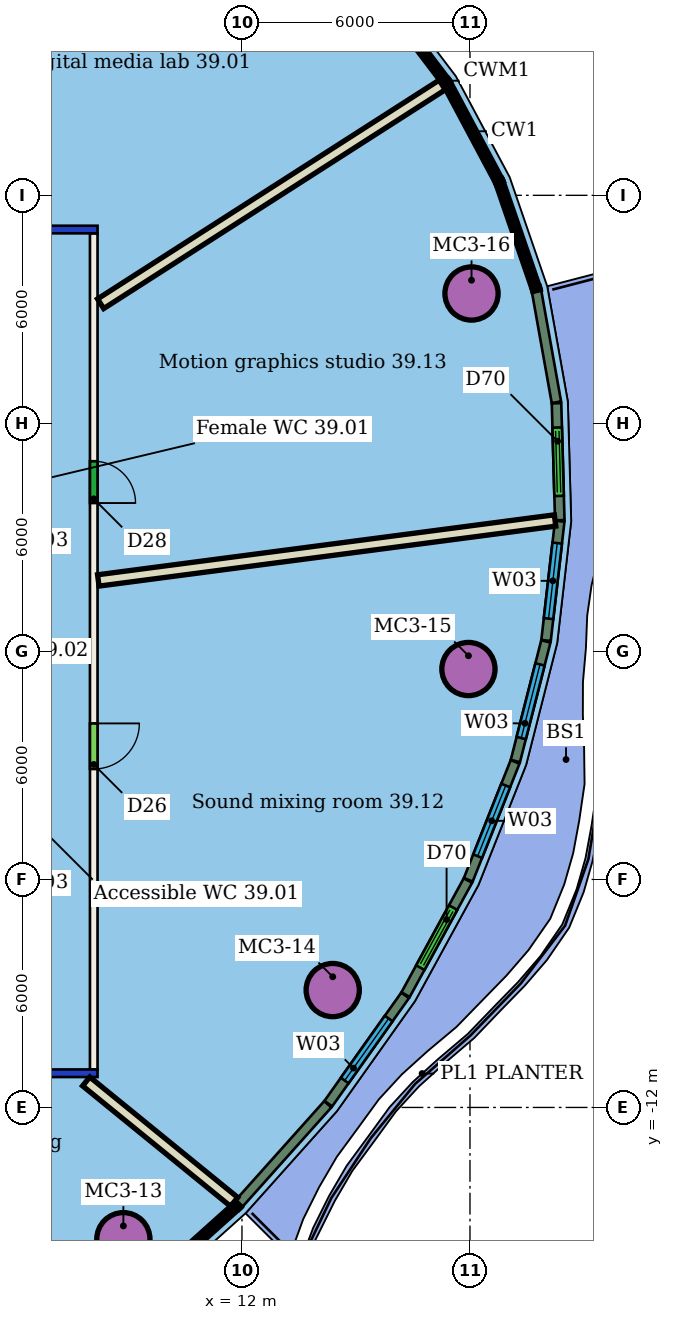
"""IFC4 building model, lengths in metres.
Left out: names, types, materials, properties, quantities, classifications, styles, units other than length and angle.
Written with IfcOpenShell. Run it as: python <this file> out.ifc"""

import sys

from ifc_helpers import new_model, si_unit, direction, frame, frame_2d, origin, origin_2d, place, context, subcontext, project, spatial, rectangle, hollow_circle, extrude, element, fill, save


model = new_model("IFC4")
c1 = context("Model", 3, precision=1e-05, world=origin(), true_north=direction((0.0, 1.0)))
c2 = subcontext(c1, "Body", "Model", "MODEL_VIEW")
j1 = project(units=[si_unit("LENGTHUNIT", "METRE"), si_unit("PLANEANGLEUNIT", "RADIAN")], contexts=[c1])
p1 = place(None, origin())
s1 = spatial("IfcSite", under=j1, at=p1, CompositionType="ELEMENT")
p2 = place(p1, origin())
s2 = spatial("IfcBuilding", under=s1, at=p2, CompositionType="ELEMENT")
p3 = place(p2, frame((0.0, 0.0, 165.0)))
s3 = spatial("IfcBuildingStorey", under=s2, at=p3, CompositionType="ELEMENT", Elevation=165.0)
for number, where, z_axis, x_axis in (
    (1, (8.879, -15.467, 0.0), (0.0, 0.0, 1.0), (1.0, 0.0, 0.0)),
    (2, (14.388, -8.912, 0.0), (0.0, 0.0, 1.0), (1.0, 0.0, 0.0)),
    (3, (17.959, -0.464, 0.0), (0.0, 0.0, 1.0), (1.0, 0.0, 0.0)),
    (4, (18.041, 9.417, 0.0), (0.0, 0.0, 1.0), (1.0, 0.0, 0.0)),
):
    element("IfcColumn", number, at=place(p3, frame(where, z_axis=z_axis, x_axis=x_axis)), inside=s3, PredefinedType="COLUMN", context=c2, shape_type="SweptSolid", body=[
        extrude(hollow_circle(Radius=0.7, WallThickness=0.05, at=origin_2d()), origin(), (0.0, 0.0, 1.0), 3.45),
    ])
p4 = place(p3, frame((8.2, -11.1, 0.0), z_axis=(0.0, 0.0, 1.0), x_axis=(-1.0, 0.0, 0.0)))
e5 = element("IfcWall", 5, at=p4, inside=s3, PredefinedType="PARTITIONING", context=c2, shape_type="SweptSolid", body=[
    extrude(rectangle(XDim=28.4, YDim=0.2, at=frame_2d((14.2, 0.0))), origin(), (0.0, 0.0, 1.0), 3.05),
])
p5 = place(p4, frame((24.59, 0.0, 0.0)))
e6 = element("IfcOpeningElement", 6, at=p5, cuts=e5, PredefinedType="OPENING", context=c2, shape_type="SweptSolid", body=[
    extrude(rectangle(XDim=1.2, YDim=2.1, at=frame_2d((0.6, 1.05))), frame((0.0, 0.11, 0.0), z_axis=(0.0, -1.0, 0.0), x_axis=(1.0, 0.0, 0.0)), (0.0, 0.0, 1.0), 0.22),
])
p6 = place(p4, frame((19.316, 0.0, 0.0)))
e7 = element("IfcOpeningElement", 7, at=p6, cuts=e5, PredefinedType="OPENING", context=c2, shape_type="SweptSolid", body=[
    extrude(rectangle(XDim=1.2, YDim=2.1, at=frame_2d((0.6, 1.05))), frame((0.0, 0.11, 0.0), z_axis=(0.0, -1.0, 0.0), x_axis=(1.0, 0.0, 0.0)), (0.0, 0.0, 1.0), 0.22),
])
p7 = place(p4, frame((14.986, 0.0, 0.0)))
e8 = element("IfcOpeningElement", 8, at=p7, cuts=e5, PredefinedType="OPENING", context=c2, shape_type="SweptSolid", body=[
    extrude(rectangle(XDim=1.8, YDim=2.4, at=frame_2d((0.9, 1.2))), frame((0.0, 0.11, 0.0), z_axis=(0.0, -1.0, 0.0), x_axis=(1.0, 0.0, 0.0)), (0.0, 0.0, 1.0), 0.22),
])
p8 = place(p4, frame((8.594, 0.0, 0.0)))
e9 = element("IfcOpeningElement", 9, at=p8, cuts=e5, PredefinedType="OPENING", context=c2, shape_type="SweptSolid", body=[
    extrude(rectangle(XDim=1.5, YDim=2.1, at=frame_2d((0.75, 1.05))), frame((0.0, 0.11, 0.0), z_axis=(0.0, -1.0, 0.0), x_axis=(1.0, 0.0, 0.0)), (0.0, 0.0, 1.0), 0.22),
])
p9 = place(p4, frame((4.011, 0.0, 0.0)))
e10 = element("IfcOpeningElement", 10, at=p9, cuts=e5, PredefinedType="OPENING", context=c2, shape_type="SweptSolid", body=[
    extrude(rectangle(XDim=1.2, YDim=2.1, at=frame_2d((0.6, 1.05))), frame((0.0, 0.11, 0.0), z_axis=(0.0, -1.0, 0.0), x_axis=(1.0, 0.0, 0.0)), (0.0, 0.0, 1.0), 0.22),
])
p10 = place(p3, frame((-20.2, 11.1, 0.0), z_axis=(0.0, 0.0, 1.0), x_axis=(1.0, 0.0, 0.0)))
e11 = element("IfcWall", 11, at=p10, inside=s3, PredefinedType="PARTITIONING", context=c2, shape_type="SweptSolid", body=[
    extrude(rectangle(XDim=28.4, YDim=0.2, at=frame_2d((14.2, 0.0))), origin(), (0.0, 0.0, 1.0), 3.05),
])
p11 = place(p10, frame((23.297, 0.0, 0.0)))
e12 = element("IfcOpeningElement", 12, at=p11, cuts=e11, PredefinedType="OPENING", context=c2, shape_type="SweptSolid", body=[
    extrude(rectangle(XDim=1.0, YDim=2.1, at=frame_2d((0.5, 1.05))), frame((0.0, 0.11, 0.0), z_axis=(0.0, -1.0, 0.0), x_axis=(1.0, 0.0, 0.0)), (0.0, 0.0, 1.0), 0.22),
])
p12 = place(p10, frame((15.555, 0.0, 0.0)))
e13 = element("IfcOpeningElement", 13, at=p12, cuts=e11, PredefinedType="OPENING", context=c2, shape_type="SweptSolid", body=[
    extrude(rectangle(XDim=1.8, YDim=2.1, at=frame_2d((0.9, 1.05))), frame((0.0, 0.11, 0.0), z_axis=(0.0, -1.0, 0.0), x_axis=(1.0, 0.0, 0.0)), (0.0, 0.0, 1.0), 0.22),
])
p13 = place(p10, frame((4.251, 0.0, 0.0)))
e14 = element("IfcOpeningElement", 14, at=p13, cuts=e11, PredefinedType="OPENING", context=c2, shape_type="SweptSolid", body=[
    extrude(rectangle(XDim=0.9, YDim=2.1, at=frame_2d((0.45, 1.05))), frame((0.0, 0.11, 0.0), z_axis=(0.0, -1.0, 0.0), x_axis=(1.0, 0.0, 0.0)), (0.0, 0.0, 1.0), 0.22),
])
p14 = place(p3, frame((8.1, 11.0, 0.0), z_axis=(0.0, 0.0, 1.0), x_axis=(0.0, -1.0, 0.0)))
e15 = element("IfcWall", 15, at=p14, inside=s3, PredefinedType="PARTITIONING", context=c2, shape_type="SweptSolid", body=[
    extrude(rectangle(XDim=22.0, YDim=0.2, at=frame_2d((11.0, 0.0))), origin(), (0.0, 0.0, 1.0), 3.45),
])
p15 = place(p14, frame((12.895, 0.0, 0.0)))
e16 = element("IfcOpeningElement", 16, at=p15, cuts=e15, PredefinedType="OPENING", context=c2, shape_type="SweptSolid", body=[
    extrude(rectangle(XDim=1.2, YDim=2.1, at=frame_2d((0.6, 1.05))), frame((0.0, 0.11, 0.0), z_axis=(0.0, -1.0, 0.0), x_axis=(1.0, 0.0, 0.0)), (0.0, 0.0, 1.0), 0.22),
])
p16 = place(p14, frame((5.997, 0.0, 0.0)))
e17 = element("IfcOpeningElement", 17, at=p16, cuts=e15, PredefinedType="OPENING", context=c2, shape_type="SweptSolid", body=[
    extrude(rectangle(XDim=1.1, YDim=2.1, at=frame_2d((0.55, 1.05))), frame((0.0, 0.11, 0.0), z_axis=(0.0, -1.0, 0.0), x_axis=(1.0, 0.0, 0.0)), (0.0, 0.0, 1.0), 0.22),
])
p17 = place(p3, frame((17.27, 14.905, 0.0), z_axis=(0.0, 0.0, 1.0), x_axis=(-0.842071977219, -0.539365168678, 0.0)))
e18 = element("IfcWall", 18, at=p17, inside=s3, PredefinedType="PARTITIONING", context=c2, shape_type="SweptSolid", body=[
    extrude(rectangle(XDim=10.675, YDim=0.3, at=frame_2d((5.337, 0.0))), origin(), (0.0, 0.0, 1.0), 3.45),
])
p18 = place(p3, frame((8.101, 22.394, 0.0), z_axis=(0.0, 0.0, 1.0), x_axis=(-0.532862885492, -0.846201598477, 0.0)))
e19 = element("IfcWall", 19, at=p18, inside=s3, PredefinedType="PARTITIONING", context=c2, shape_type="SweptSolid", body=[
    extrude(rectangle(XDim=13.181, YDim=0.15, at=frame_2d((6.59, 0.0))), origin(), (0.0, 0.0, 1.0), 3.45),
])
p19 = place(p3, frame((11.794, -14.485, 0.0), z_axis=(0.0, 0.0, 1.0), x_axis=(-0.775534864138, 0.63130473981, 0.0)))
e20 = element("IfcWall", 20, at=p19, inside=s3, PredefinedType="PARTITIONING", context=c2, shape_type="SweptSolid", body=[
    extrude(rectangle(XDim=5.019, YDim=0.3, at=frame_2d((2.509, 0.0))), origin(), (0.0, 0.0, 1.0), 3.45),
])
p20 = place(p3, frame((20.239, 3.444, 0.0), z_axis=(0.0, 0.0, 1.0), x_axis=(-0.991492708273, -0.130162242765, 0.0)))
e21 = element("IfcWall", 21, at=p20, inside=s3, PredefinedType="PARTITIONING", context=c2, shape_type="SweptSolid", body=[
    extrude(rectangle(XDim=12.122, YDim=0.3, at=frame_2d((6.061, 0.0))), origin(), (0.0, 0.0, 1.0), 3.45),
])
p21 = place(p3, frame((11.919, -14.532, 0.0), z_axis=(0.0, 0.0, 1.0), x_axis=(0.666731798782, 0.745297731443, 0.0)))
e22 = element("IfcWall", 22, at=p21, inside=s3, PredefinedType="SOLIDWALL", context=c2, shape_type="SweptSolid", body=[
    extrude(rectangle(XDim=3.508, YDim=0.25, at=frame_2d((1.754, 0.0))), origin(), (0.0, 0.0, 1.0), 3.1),
])
p22 = place(p3, frame((14.271, -11.9, 0.0), z_axis=(0.0, 0.0, 1.0), x_axis=(0.578670547214, 0.815561400378, 0.0)))
e23 = element("IfcWall", 23, at=p22, inside=s3, PredefinedType="SOLIDWALL", context=c2, shape_type="SweptSolid", body=[
    extrude(rectangle(XDim=3.494, YDim=0.25, at=frame_2d((1.747, 0.0))), origin(), (0.0, 0.0, 1.0), 3.1),
])
p23 = place(p22, frame((0.747, 0.0, 0.9)))
e24 = element("IfcOpeningElement", 24, at=p23, cuts=e23, PredefinedType="OPENING", context=c2, shape_type="SweptSolid", body=[
    extrude(rectangle(XDim=2.0, YDim=2.1, at=frame_2d((1.0, 1.05))), frame((0.0, 0.135, 0.0), z_axis=(0.0, -1.0, 0.0), x_axis=(1.0, 0.0, 0.0)), (0.0, 0.0, 1.0), 0.27),
])
p24 = place(p3, frame((16.305, -9.032, 0.0), z_axis=(0.0, 0.0, 1.0), x_axis=(0.479577095585, 0.87749974894, 0.0)))
e25 = element("IfcWall", 25, at=p24, inside=s3, PredefinedType="SOLIDWALL", context=c2, shape_type="SweptSolid", body=[
    extrude(rectangle(XDim=3.42, YDim=0.25, at=frame_2d((1.71, 0.0))), origin(), (0.0, 0.0, 1.0), 3.1),
])
p25 = place(p24, frame((0.81, 0.0, 0.0)))
e26 = element("IfcOpeningElement", 26, at=p25, cuts=e25, PredefinedType="OPENING", context=c2, shape_type="SweptSolid", body=[
    extrude(rectangle(XDim=1.8, YDim=2.4, at=frame_2d((0.9, 1.2))), frame((0.0, 0.135, 0.0), z_axis=(0.0, -1.0, 0.0), x_axis=(1.0, 0.0, 0.0)), (0.0, 0.0, 1.0), 0.27),
])
p26 = place(p3, frame((17.956, -6.009, 0.0), z_axis=(0.0, 0.0, 1.0), x_axis=(0.369043171551, 0.92941225381, 0.0)))
e27 = element("IfcWall", 27, at=p26, inside=s3, PredefinedType="SOLIDWALL", context=c2, shape_type="SweptSolid", body=[
    extrude(rectangle(XDim=3.337, YDim=0.25, at=frame_2d((1.668, 0.0))), origin(), (0.0, 0.0, 1.0), 3.1),
])
p27 = place(p26, frame((0.668, 0.0, 0.9)))
e28 = element("IfcOpeningElement", 28, at=p27, cuts=e27, PredefinedType="OPENING", context=c2, shape_type="SweptSolid", body=[
    extrude(rectangle(XDim=2.0, YDim=2.1, at=frame_2d((1.0, 1.05))), frame((0.0, 0.135, 0.0), z_axis=(0.0, -1.0, 0.0), x_axis=(1.0, 0.0, 0.0)), (0.0, 0.0, 1.0), 0.27),
])
p28 = place(p3, frame((19.195, -2.885, 0.0), z_axis=(0.0, 0.0, 1.0), x_axis=(0.246989866145, 0.969018062794, 0.0)))
e29 = element("IfcWall", 29, at=p28, inside=s3, PredefinedType="SOLIDWALL", context=c2, shape_type="SweptSolid", body=[
    extrude(rectangle(XDim=3.248, YDim=0.25, at=frame_2d((1.624, 0.0))), origin(), (0.0, 0.0, 1.0), 3.1),
])
p29 = place(p28, frame((0.624, 0.0, 0.9)))
e30 = element("IfcOpeningElement", 30, at=p29, cuts=e29, PredefinedType="OPENING", context=c2, shape_type="SweptSolid", body=[
    extrude(rectangle(XDim=2.0, YDim=2.1, at=frame_2d((1.0, 1.05))), frame((0.0, 0.135, 0.0), z_axis=(0.0, -1.0, 0.0), x_axis=(1.0, 0.0, 0.0)), (0.0, 0.0, 1.0), 0.27),
])
p30 = place(p3, frame((20.001, 0.287, 0.0), z_axis=(0.0, 0.0, 1.0), x_axis=(0.114119674423, 0.993467009975, 0.0)))
e31 = element("IfcWall", 31, at=p30, inside=s3, PredefinedType="SOLIDWALL", context=c2, shape_type="SweptSolid", body=[
    extrude(rectangle(XDim=3.16, YDim=0.25, at=frame_2d((1.58, 0.0))), origin(), (0.0, 0.0, 1.0), 3.1),
])
p31 = place(p30, frame((0.58, 0.0, 0.9)))
e32 = element("IfcOpeningElement", 32, at=p31, cuts=e31, PredefinedType="OPENING", context=c2, shape_type="SweptSolid", body=[
    extrude(rectangle(XDim=2.0, YDim=2.1, at=frame_2d((1.0, 1.05))), frame((0.0, 0.135, 0.0), z_axis=(0.0, -1.0, 0.0), x_axis=(1.0, 0.0, 0.0)), (0.0, 0.0, 1.0), 0.27),
])
p32 = place(p3, frame((20.363, 3.452, 0.0), z_axis=(0.0, 0.0, 1.0), x_axis=(-0.027916757258, 0.99961025138, 0.0)))
e33 = element("IfcWall", 33, at=p32, inside=s3, PredefinedType="SOLIDWALL", context=c2, shape_type="SweptSolid", body=[
    extrude(rectangle(XDim=3.078, YDim=0.25, at=frame_2d((1.539, 0.0))), origin(), (0.0, 0.0, 1.0), 3.1),
])
p33 = place(p32, frame((0.639, 0.0, 0.0)))
e34 = element("IfcOpeningElement", 34, at=p33, cuts=e33, PredefinedType="OPENING", context=c2, shape_type="SweptSolid", body=[
    extrude(rectangle(XDim=1.8, YDim=2.4, at=frame_2d((0.9, 1.2))), frame((0.0, 0.135, 0.0), z_axis=(0.0, -1.0, 0.0), x_axis=(1.0, 0.0, 0.0)), (0.0, 0.0, 1.0), 0.27),
])
p34 = place(p3, frame((20.275, 6.555, 0.0), z_axis=(0.0, 0.0, 1.0), x_axis=(-0.176055314448, 0.984380275226, 0.0)))
e35 = element("IfcWall", 35, at=p34, inside=s3, PredefinedType="SOLIDWALL", context=c2, shape_type="SweptSolid", body=[
    extrude(rectangle(XDim=2.969, YDim=0.25, at=frame_2d((1.484, 0.0))), origin(), (0.0, 0.0, 1.0), 3.1),
])
p35 = place(p15, origin())
e36 = element("IfcDoor", 36, at=p35, inside=s3, OperationType="SINGLE_SWING_LEFT", PredefinedType="DOOR", context=c2, shape_type="SweptSolid", body=[
    extrude(rectangle(XDim=1.2, YDim=2.1, at=frame_2d((0.6, 1.05))), frame((0.0, 0.025, 0.0), z_axis=(0.0, -1.0, 0.0), x_axis=(1.0, 0.0, 0.0)), (0.0, 0.0, 1.0), 0.05),
])
fill(e16, e36)
p36 = place(p16, origin())
e37 = element("IfcDoor", 37, at=p36, inside=s3, OperationType="SINGLE_SWING_RIGHT", PredefinedType="DOOR", context=c2, shape_type="SweptSolid", body=[
    extrude(rectangle(XDim=1.1, YDim=2.1, at=frame_2d((0.55, 1.05))), frame((0.0, 0.025, 0.0), z_axis=(0.0, -1.0, 0.0), x_axis=(1.0, 0.0, 0.0)), (0.0, 0.0, 1.0), 0.05),
])
fill(e17, e37)
p37 = place(p23, origin())
e38 = element("IfcWindow", 38, at=p37, inside=s3, PartitioningType="SINGLE_PANEL", PredefinedType="WINDOW", context=c2, shape_type="SweptSolid", body=[
    extrude(rectangle(XDim=2.0, YDim=2.1, at=frame_2d((1.0, 1.05))), frame((0.0, 0.03, 0.0), z_axis=(0.0, -1.0, 0.0), x_axis=(1.0, 0.0, 0.0)), (0.0, 0.0, 1.0), 0.06),
])
fill(e24, e38)
p38 = place(p25, origin())
e39 = element("IfcDoor", 39, at=p38, inside=s3, OperationType="DOUBLE_DOOR_SLIDING", PredefinedType="DOOR", context=c2, shape_type="SweptSolid", body=[
    extrude(rectangle(XDim=1.8, YDim=2.4, at=frame_2d((0.9, 1.2))), frame((0.0, 0.025, 0.0), z_axis=(0.0, -1.0, 0.0), x_axis=(1.0, 0.0, 0.0)), (0.0, 0.0, 1.0), 0.05),
])
fill(e26, e39)
p39 = place(p27, origin())
e40 = element("IfcWindow", 40, at=p39, inside=s3, PartitioningType="SINGLE_PANEL", PredefinedType="WINDOW", context=c2, shape_type="SweptSolid", body=[
    extrude(rectangle(XDim=2.0, YDim=2.1, at=frame_2d((1.0, 1.05))), frame((0.0, 0.03, 0.0), z_axis=(0.0, -1.0, 0.0), x_axis=(1.0, 0.0, 0.0)), (0.0, 0.0, 1.0), 0.06),
])
fill(e28, e40)
p40 = place(p29, origin())
e41 = element("IfcWindow", 41, at=p40, inside=s3, PartitioningType="SINGLE_PANEL", PredefinedType="WINDOW", context=c2, shape_type="SweptSolid", body=[
    extrude(rectangle(XDim=2.0, YDim=2.1, at=frame_2d((1.0, 1.05))), frame((0.0, 0.03, 0.0), z_axis=(0.0, -1.0, 0.0), x_axis=(1.0, 0.0, 0.0)), (0.0, 0.0, 1.0), 0.06),
])
fill(e30, e41)
p41 = place(p31, origin())
e42 = element("IfcWindow", 42, at=p41, inside=s3, PartitioningType="SINGLE_PANEL", PredefinedType="WINDOW", context=c2, shape_type="SweptSolid", body=[
    extrude(rectangle(XDim=2.0, YDim=2.1, at=frame_2d((1.0, 1.05))), frame((0.0, 0.03, 0.0), z_axis=(0.0, -1.0, 0.0), x_axis=(1.0, 0.0, 0.0)), (0.0, 0.0, 1.0), 0.06),
])
fill(e32, e42)
p42 = place(p33, origin())
e43 = element("IfcDoor", 43, at=p42, inside=s3, OperationType="DOUBLE_DOOR_SLIDING", PredefinedType="DOOR", context=c2, shape_type="SweptSolid", body=[
    extrude(rectangle(XDim=1.8, YDim=2.4, at=frame_2d((0.9, 1.2))), frame((0.0, 0.025, 0.0), z_axis=(0.0, -1.0, 0.0), x_axis=(1.0, 0.0, 0.0)), (0.0, 0.0, 1.0), 0.05),
])
fill(e34, e43)
save(model, sys.argv[1])
